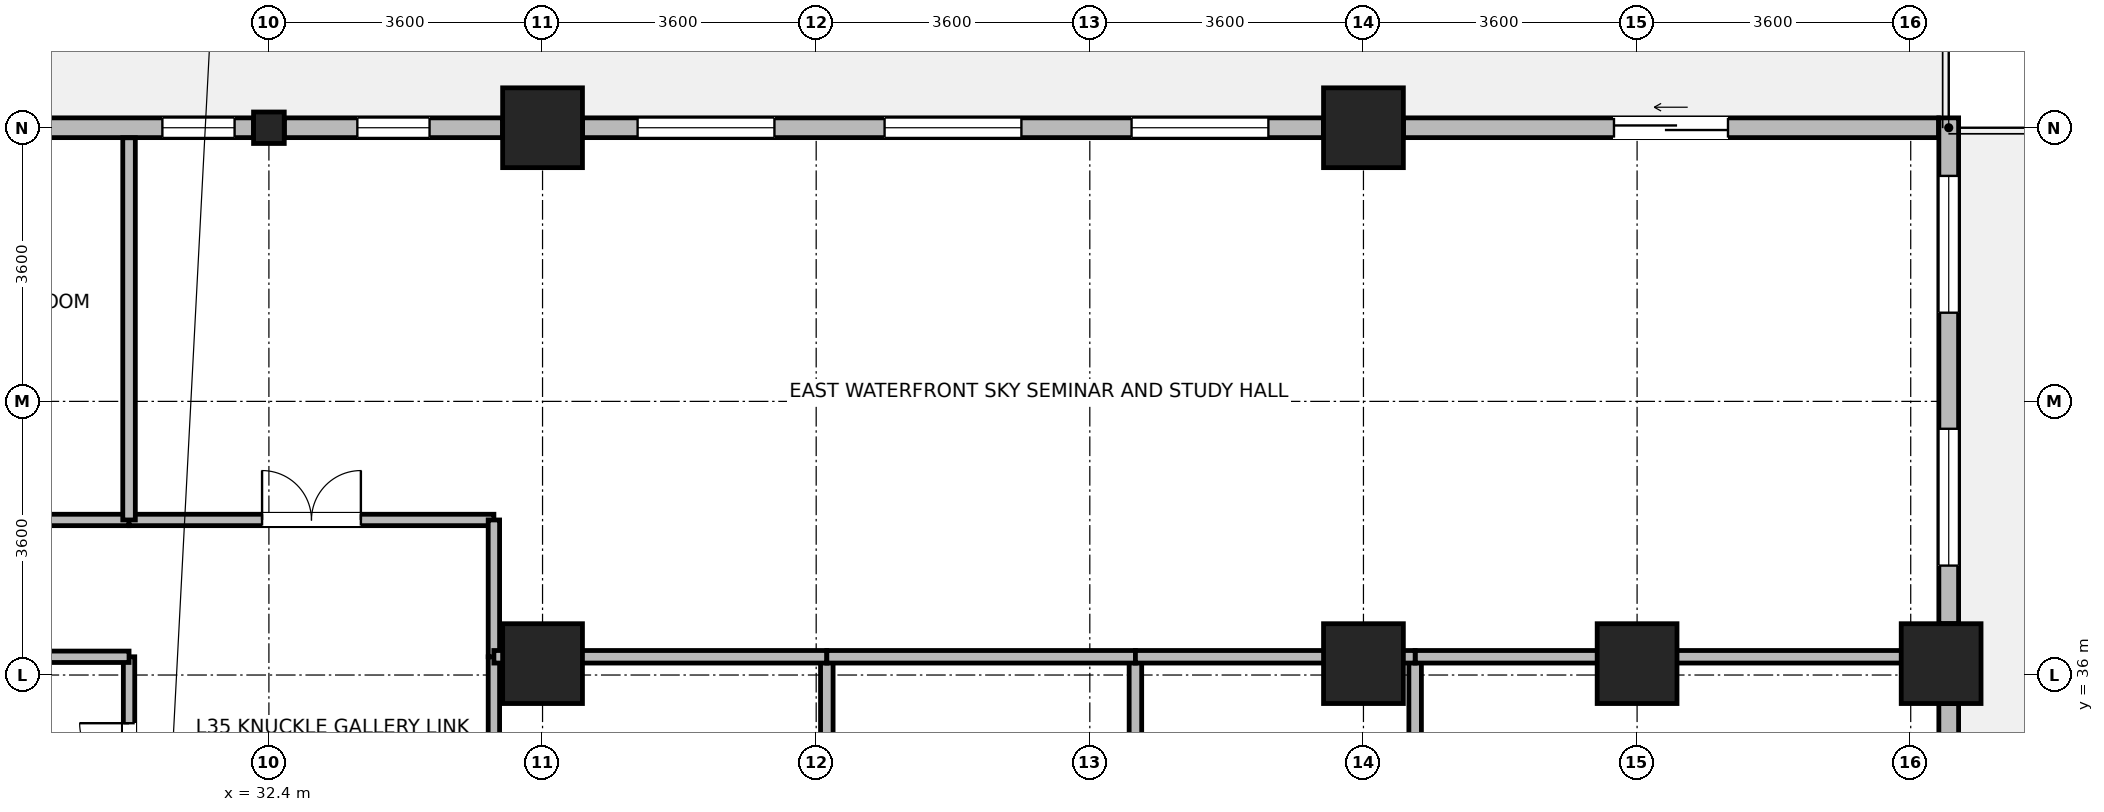
"""IFC4 building model, lengths in metres.
Left out: names, types, materials, properties, quantities, classifications, styles, units other than length and angle.
Written with IfcOpenShell. Run it as: python <this file> out.ifc"""

import sys

from ifc_helpers import new_model, si_unit, direction, frame, frame_2d, origin, origin_2d, place, context, subcontext, project, spatial, rectangle, i_section, extrude, source, transform, mapped, element, fill, save


model = new_model("IFC4")
c1 = context("Model", 3, precision=1e-05, world=origin(), true_north=direction((0.0, 1.0)))
c2 = subcontext(c1, "Body", "Model", "MODEL_VIEW")
j1 = project(units=[si_unit("LENGTHUNIT", "METRE"), si_unit("PLANEANGLEUNIT", "RADIAN")], contexts=[c1])
p1 = place(None, origin())
s1 = spatial("IfcSite", under=j1, at=p1, CompositionType="ELEMENT")
p2 = place(p1, origin())
s2 = spatial("IfcBuilding", under=s1, at=p2, CompositionType="ELEMENT")
p3 = place(p2, frame((0.0, 0.0, 140.2)))
s3 = spatial("IfcBuildingStorey", under=s2, at=p3, CompositionType="ELEMENT", Elevation=140.2)
m1 = source(origin(), c2, "Body", "SweptSolid", [
    extrude(rectangle(XDim=1.05, YDim=1.05, at=origin_2d()), origin(), (0.0, 0.0, 1.0), 3.7),
])
for number, where, z_axis, x_axis in (
    (1, (36.0, 43.2, 0.0), (0.0, 0.0, 1.0), (1.0, 0.0, 0.0)),
    (2, (36.0, 36.15, 0.0), (0.0, 0.0, 1.0), (1.0, 0.0, 0.0)),
    (3, (46.8, 36.15, 0.0), (0.0, 0.0, 1.0), (1.0, 0.0, 0.0)),
    (4, (46.8, 43.2, 0.0), (0.0, 0.0, 1.0), (1.0, 0.0, 0.0)),
    (5, (50.4, 36.15, 0.0), (0.0, 0.0, 1.0), (1.0, 0.0, 0.0)),
    (6, (54.4, 36.15, 0.0), (0.0, 0.0, 1.0), (1.0, 0.0, 0.0)),
):
    element("IfcColumn", number, at=place(p3, frame(where, z_axis=z_axis, x_axis=x_axis)), inside=s3, PredefinedType="COLUMN", context=c2, shape_type="MappedRepresentation", body=[
        mapped(m1, transform((0.0, 0.0, 0.0), x_axis=(1.0, 0.0, 0.0), y_axis=(0.0, 1.0, 0.0), z_axis=(0.0, 0.0, 1.0), scale=1.0)),
    ])
m2 = source(origin(), c2, "Body", "SweptSolid", [
    extrude(i_section(OverallWidth=0.404, OverallDepth=0.414, WebThickness=0.021, FlangeThickness=0.028, FilletRadius=0.015, at=origin_2d()), origin(), (0.0, 0.0, 1.0), 3.7),
])
p4 = place(p3, frame((32.4, 43.2, 0.0), z_axis=(0.0, 0.0, 1.0), x_axis=(1.0, 0.0, 0.0)))
e7 = element("IfcColumn", 7, at=p4, inside=s3, PredefinedType="COLUMN", context=c2, shape_type="MappedRepresentation", body=[
    mapped(m2, transform((0.0, 0.0, 0.0), x_axis=(1.0, 0.0, 0.0), y_axis=(0.0, 1.0, 0.0), z_axis=(0.0, 0.0, 1.0), scale=1.0)),
])
p5 = place(p3, frame((54.5, 35.624, 0.0), z_axis=(0.0, 0.0, 1.0), x_axis=(0.0, -1.0, 0.0)))
e8 = element("IfcWall", 8, at=p5, inside=s3, PredefinedType="STANDARD", context=c2, shape_type="SweptSolid", body=[
    extrude(rectangle(XDim=6.448, YDim=0.26, at=frame_2d((3.224, 0.0))), origin(), (0.0, 0.0, 1.0), 2.99),
])
p6 = place(p5, frame((0.712, 0.0, 0.85)))
e9 = element("IfcOpeningElement", 9, at=p6, cuts=e8, PredefinedType="OPENING", context=c2, shape_type="SweptSolid", body=[
    extrude(rectangle(XDim=1.8, YDim=1.85, at=frame_2d((0.9, 0.925))), frame((0.0, 0.14, 0.0), z_axis=(0.0, -1.0, 0.0), x_axis=(1.0, 0.0, 0.0)), (0.0, 0.0, 1.0), 0.28),
])
p7 = place(p5, frame((3.936, 0.0, 0.85)))
e10 = element("IfcOpeningElement", 10, at=p7, cuts=e8, PredefinedType="OPENING", context=c2, shape_type="SweptSolid", body=[
    extrude(rectangle(XDim=1.8, YDim=1.85, at=frame_2d((0.9, 0.925))), frame((0.0, 0.14, 0.0), z_axis=(0.0, -1.0, 0.0), x_axis=(1.0, 0.0, 0.0)), (0.0, 0.0, 1.0), 0.28),
])
p8 = place(p3, frame((54.5, 43.33, 0.0), z_axis=(0.0, 0.0, 1.0), x_axis=(0.0, -1.0, 0.0)))
e11 = element("IfcWall", 11, at=p8, inside=s3, PredefinedType="STANDARD", context=c2, shape_type="SweptSolid", body=[
    extrude(rectangle(XDim=6.654, YDim=0.26, at=frame_2d((3.327, 0.0))), origin(), (0.0, 0.0, 1.0), 3.44),
])
p9 = place(p8, frame((0.763, 0.0, 0.85)))
e12 = element("IfcOpeningElement", 12, at=p9, cuts=e11, PredefinedType="OPENING", context=c2, shape_type="SweptSolid", body=[
    extrude(rectangle(XDim=1.8, YDim=1.85, at=frame_2d((0.9, 0.925))), frame((0.0, 0.14, 0.0), z_axis=(0.0, -1.0, 0.0), x_axis=(1.0, 0.0, 0.0)), (0.0, 0.0, 1.0), 0.28),
])
p10 = place(p8, frame((4.091, 0.0, 0.85)))
e13 = element("IfcOpeningElement", 13, at=p10, cuts=e11, PredefinedType="OPENING", context=c2, shape_type="SweptSolid", body=[
    extrude(rectangle(XDim=1.8, YDim=1.85, at=frame_2d((0.9, 0.925))), frame((0.0, 0.14, 0.0), z_axis=(0.0, -1.0, 0.0), x_axis=(1.0, 0.0, 0.0)), (0.0, 0.0, 1.0), 0.28),
])
p11 = place(p3, frame((47.326, 43.2, 0.0), z_axis=(0.0, 0.0, 1.0), x_axis=(1.0, 0.0, 0.0)))
e14 = element("IfcWall", 14, at=p11, inside=s3, PredefinedType="STANDARD", context=c2, shape_type="SweptSolid", body=[
    extrude(rectangle(XDim=7.039, YDim=0.26, at=frame_2d((3.52, 0.0))), origin(), (0.0, 0.0, 1.0), 3.44),
])
p12 = place(p11, frame((2.77, 0.0, 0.0)))
e15 = element("IfcOpeningElement", 15, at=p12, cuts=e14, PredefinedType="OPENING", context=c2, shape_type="SweptSolid", body=[
    extrude(rectangle(XDim=1.5, YDim=2.15, at=frame_2d((0.75, 1.075))), frame((0.0, 0.14, 0.0), z_axis=(0.0, -1.0, 0.0), x_axis=(1.0, 0.0, 0.0)), (0.0, 0.0, 1.0), 0.28),
])
p13 = place(p3, frame((36.526, 43.2, 0.0), z_axis=(0.0, 0.0, 1.0), x_axis=(1.0, 0.0, 0.0)))
e16 = element("IfcWall", 16, at=p13, inside=s3, PredefinedType="STANDARD", context=c2, shape_type="SweptSolid", body=[
    extrude(rectangle(XDim=9.748, YDim=0.26, at=frame_2d((4.874, 0.0))), origin(), (0.0, 0.0, 1.0), 2.99),
])
p14 = place(p13, frame((0.725, 0.0, 0.85)))
e17 = element("IfcOpeningElement", 17, at=p14, cuts=e16, PredefinedType="OPENING", context=c2, shape_type="SweptSolid", body=[
    extrude(rectangle(XDim=1.8, YDim=1.85, at=frame_2d((0.9, 0.925))), frame((0.0, 0.14, 0.0), z_axis=(0.0, -1.0, 0.0), x_axis=(1.0, 0.0, 0.0)), (0.0, 0.0, 1.0), 0.28),
])
p15 = place(p13, frame((3.974, 0.0, 0.85)))
e18 = element("IfcOpeningElement", 18, at=p15, cuts=e16, PredefinedType="OPENING", context=c2, shape_type="SweptSolid", body=[
    extrude(rectangle(XDim=1.8, YDim=1.85, at=frame_2d((0.9, 0.925))), frame((0.0, 0.14, 0.0), z_axis=(0.0, -1.0, 0.0), x_axis=(1.0, 0.0, 0.0)), (0.0, 0.0, 1.0), 0.28),
])
p16 = place(p13, frame((7.223, 0.0, 0.85)))
e19 = element("IfcOpeningElement", 19, at=p16, cuts=e16, PredefinedType="OPENING", context=c2, shape_type="SweptSolid", body=[
    extrude(rectangle(XDim=1.8, YDim=1.85, at=frame_2d((0.9, 0.925))), frame((0.0, 0.14, 0.0), z_axis=(0.0, -1.0, 0.0), x_axis=(1.0, 0.0, 0.0)), (0.0, 0.0, 1.0), 0.28),
])
p17 = place(p3, frame((32.603, 43.2, 0.0), z_axis=(0.0, 0.0, 1.0), x_axis=(1.0, 0.0, 0.0)))
e20 = element("IfcWall", 20, at=p17, inside=s3, PredefinedType="STANDARD", context=c2, shape_type="SweptSolid", body=[
    extrude(rectangle(XDim=2.871, YDim=0.26, at=frame_2d((1.436, 0.0))), origin(), (0.0, 0.0, 1.0), 2.99),
])
p18 = place(p17, frame((0.96, 0.0, 0.85)))
e21 = element("IfcOpeningElement", 21, at=p18, cuts=e20, PredefinedType="OPENING", context=c2, shape_type="SweptSolid", body=[
    extrude(rectangle(XDim=0.95, YDim=1.75, at=frame_2d((0.475, 0.875))), frame((0.0, 0.14, 0.0), z_axis=(0.0, -1.0, 0.0), x_axis=(1.0, 0.0, 0.0)), (0.0, 0.0, 1.0), 0.28),
])
p19 = place(p3, frame((29.326, 43.2, 0.0), z_axis=(0.0, 0.0, 1.0), x_axis=(1.0, 0.0, 0.0)))
e22 = element("IfcWall", 22, at=p19, inside=s3, PredefinedType="STANDARD", context=c2, shape_type="SweptSolid", body=[
    extrude(rectangle(XDim=2.871, YDim=0.26, at=frame_2d((1.436, 0.0))), origin(), (0.0, 0.0, 1.0), 2.99),
])
p20 = place(p19, frame((1.673, 0.0, 0.85)))
e23 = element("IfcOpeningElement", 23, at=p20, cuts=e22, PredefinedType="OPENING", context=c2, shape_type="SweptSolid", body=[
    extrude(rectangle(XDim=0.95, YDim=1.75, at=frame_2d((0.475, 0.875))), frame((0.0, 0.14, 0.0), z_axis=(0.0, -1.0, 0.0), x_axis=(1.0, 0.0, 0.0)), (0.0, 0.0, 1.0), 0.28),
])
p21 = place(p3, frame((35.36, 28.56, 0.0), z_axis=(0.0, 0.0, 1.0), x_axis=(0.0, 1.0, 0.0)))
e24 = element("IfcWall", 24, at=p21, inside=s3, PredefinedType="PARTITIONING", context=c2, shape_type="SweptSolid", body=[
    extrude(rectangle(XDim=7.68, YDim=0.15, at=frame_2d((3.84, 0.0))), origin(), (0.0, 0.0, 1.0), 3.44),
])
p22 = place(p21, frame((3.19, 0.0, 0.0)))
e25 = element("IfcOpeningElement", 25, at=p22, cuts=e24, PredefinedType="OPENING", context=c2, shape_type="SweptSolid", body=[
    extrude(rectangle(XDim=1.3, YDim=2.12, at=frame_2d((0.65, 1.06))), frame((0.0, 0.085, 0.0), z_axis=(0.0, -1.0, 0.0), x_axis=(1.0, 0.0, 0.0)), (0.0, 0.0, 1.0), 0.17),
])
p23 = place(p3, frame((25.08, 38.04, 0.0), z_axis=(0.0, 0.0, 1.0), x_axis=(1.0, 0.0, 0.0)))
e26 = element("IfcWall", 26, at=p23, inside=s3, PredefinedType="PARTITIONING", context=c2, shape_type="SweptSolid", body=[
    extrude(rectangle(XDim=5.48, YDim=0.15, at=frame_2d((2.74, 0.0))), origin(), (0.0, 0.0, 1.0), 3.44),
])
p24 = place(p23, frame((2.09, 0.0, 0.0)))
e27 = element("IfcOpeningElement", 27, at=p24, cuts=e26, PredefinedType="OPENING", context=c2, shape_type="SweptSolid", body=[
    extrude(rectangle(XDim=1.3, YDim=2.12, at=frame_2d((0.65, 1.06))), frame((0.0, 0.085, 0.0), z_axis=(0.0, -1.0, 0.0), x_axis=(1.0, 0.0, 0.0)), (0.0, 0.0, 1.0), 0.17),
])
p25 = place(p3, frame((30.56, 38.04, 0.0), z_axis=(0.0, 0.0, 1.0), x_axis=(1.0, 0.0, 0.0)))
e28 = element("IfcWall", 28, at=p25, inside=s3, PredefinedType="PARTITIONING", context=c2, shape_type="SweptSolid", body=[
    extrude(rectangle(XDim=4.8, YDim=0.15, at=frame_2d((2.4, 0.0))), origin(), (0.0, 0.0, 1.0), 3.44),
])
p26 = place(p25, frame((1.75, 0.0, 0.0)))
e29 = element("IfcOpeningElement", 29, at=p26, cuts=e28, PredefinedType="OPENING", context=c2, shape_type="SweptSolid", body=[
    extrude(rectangle(XDim=1.3, YDim=2.12, at=frame_2d((0.65, 1.06))), frame((0.0, 0.085, 0.0), z_axis=(0.0, -1.0, 0.0), x_axis=(1.0, 0.0, 0.0)), (0.0, 0.0, 1.0), 0.17),
])
p27 = place(p3, frame((30.56, 33.7, 0.0), z_axis=(0.0, 0.0, 1.0), x_axis=(0.0, 1.0, 0.0)))
e30 = element("IfcWall", 30, at=p27, inside=s3, PredefinedType="PARTITIONING", context=c2, shape_type="SweptSolid", body=[
    extrude(rectangle(XDim=2.54, YDim=0.15, at=frame_2d((1.27, 0.0))), origin(), (0.0, 0.0, 1.0), 3.44),
])
p28 = place(p27, frame((0.366, 0.0, 0.0)))
e31 = element("IfcOpeningElement", 31, at=p28, cuts=e30, PredefinedType="OPENING", context=c2, shape_type="SweptSolid", body=[
    extrude(rectangle(XDim=1.3, YDim=2.12, at=frame_2d((0.65, 1.06))), frame((0.0, 0.085, 0.0), z_axis=(0.0, -1.0, 0.0), x_axis=(1.0, 0.0, 0.0)), (0.0, 0.0, 1.0), 0.17),
])
p29 = place(p3, frame((35.36, 36.24, 0.0), z_axis=(0.0, 0.0, 1.0), x_axis=(0.0, 1.0, 0.0)))
e32 = element("IfcWall", 32, at=p29, inside=s3, PredefinedType="PARTITIONING", context=c2, shape_type="SweptSolid", body=[
    extrude(rectangle(XDim=1.8, YDim=0.15, at=frame_2d((0.9, 0.0))), origin(), (0.0, 0.0, 1.0), 3.44),
])
p30 = place(p3, frame((29.325, 36.24, 0.0), z_axis=(0.0, 0.0, 1.0), x_axis=(1.0, 0.0, 0.0)))
e33 = element("IfcWall", 33, at=p30, inside=s3, PredefinedType="PARTITIONING", context=c2, shape_type="SweptSolid", body=[
    extrude(rectangle(XDim=1.235, YDim=0.15, at=frame_2d((0.618, 0.0))), origin(), (0.0, 0.0, 1.0), 2.84),
])
for number, where, z_axis, x_axis in (
    (34, (39.74, 28.56, 0.0), (0.0, 0.0, 1.0), (0.0, 1.0, 0.0)),
    (35, (43.8, 28.56, 0.0), (0.0, 0.0, 1.0), (0.0, 1.0, 0.0)),
    (36, (47.48, 28.56, 0.0), (0.0, 0.0, 1.0), (0.0, 1.0, 0.0)),
):
    element("IfcWall", number, at=place(p3, frame(where, z_axis=z_axis, x_axis=x_axis)), inside=s3, PredefinedType="PARTITIONING", context=c2, shape_type="SweptSolid", body=[
        extrude(rectangle(XDim=7.68, YDim=0.165, at=frame_2d((3.84, 0.0))), origin(), (0.0, 0.0, 1.0), 3.44),
    ])
p31 = place(p3, frame((47.48, 36.24, 0.0), z_axis=(0.0, 0.0, 1.0), x_axis=(1.0, 0.0, 0.0)))
e37 = element("IfcWall", 37, at=p31, inside=s3, PredefinedType="PARTITIONING", context=c2, shape_type="SweptSolid", body=[
    extrude(rectangle(XDim=6.888, YDim=0.165, at=frame_2d((3.444, 0.0))), origin(), (0.0, 0.0, 1.0), 2.84),
])
p32 = place(p3, frame((30.56, 38.04, 0.0), z_axis=(0.0, 0.0, 1.0), x_axis=(0.0, 1.0, 0.0)))
e38 = element("IfcWall", 38, at=p32, inside=s3, PredefinedType="PARTITIONING", context=c2, shape_type="SweptSolid", body=[
    extrude(rectangle(XDim=5.028, YDim=0.165, at=frame_2d((2.514, 0.0))), origin(), (0.0, 0.0, 1.0), 3.44),
])
p33 = place(p3, frame((35.36, 36.24, 0.0), z_axis=(0.0, 0.0, 1.0), x_axis=(1.0, 0.0, 0.0)))
e39 = element("IfcWall", 39, at=p33, inside=s3, PredefinedType="PARTITIONING", context=c2, shape_type="SweptSolid", body=[
    extrude(rectangle(XDim=4.38, YDim=0.165, at=frame_2d((2.19, 0.0))), origin(), (0.0, 0.0, 1.0), 2.84),
])
p34 = place(p3, frame((39.74, 36.24, 0.0), z_axis=(0.0, 0.0, 1.0), x_axis=(1.0, 0.0, 0.0)))
e40 = element("IfcWall", 40, at=p34, inside=s3, PredefinedType="PARTITIONING", context=c2, shape_type="SweptSolid", body=[
    extrude(rectangle(XDim=4.06, YDim=0.165, at=frame_2d((2.03, 0.0))), origin(), (0.0, 0.0, 1.0), 2.84),
])
p35 = place(p3, frame((43.8, 36.24, 0.0), z_axis=(0.0, 0.0, 1.0), x_axis=(1.0, 0.0, 0.0)))
e41 = element("IfcWall", 41, at=p35, inside=s3, PredefinedType="PARTITIONING", context=c2, shape_type="SweptSolid", body=[
    extrude(rectangle(XDim=3.68, YDim=0.165, at=frame_2d((1.84, 0.0))), origin(), (0.0, 0.0, 1.0), 2.84),
])
p36 = place(p9, origin())
e42 = element("IfcWindow", 42, at=p36, inside=s3, PartitioningType="SINGLE_PANEL", PredefinedType="WINDOW", context=c2, shape_type="SweptSolid", body=[
    extrude(rectangle(XDim=1.8, YDim=1.85, at=frame_2d((0.9, 0.925))), frame((0.0, 0.03, 0.0), z_axis=(0.0, -1.0, 0.0), x_axis=(1.0, 0.0, 0.0)), (0.0, 0.0, 1.0), 0.06),
])
fill(e12, e42)
p37 = place(p10, origin())
e43 = element("IfcWindow", 43, at=p37, inside=s3, PartitioningType="SINGLE_PANEL", PredefinedType="WINDOW", context=c2, shape_type="SweptSolid", body=[
    extrude(rectangle(XDim=1.8, YDim=1.85, at=frame_2d((0.9, 0.925))), frame((0.0, 0.03, 0.0), z_axis=(0.0, -1.0, 0.0), x_axis=(1.0, 0.0, 0.0)), (0.0, 0.0, 1.0), 0.06),
])
fill(e13, e43)
p38 = place(p12, origin())
e44 = element("IfcDoor", 44, at=p38, inside=s3, OperationType="SLIDING_TO_LEFT", PredefinedType="DOOR", context=c2, shape_type="SweptSolid", body=[
    extrude(rectangle(XDim=1.5, YDim=2.15, at=frame_2d((0.75, 1.075))), frame((0.0, 0.025, 0.0), z_axis=(0.0, -1.0, 0.0), x_axis=(1.0, 0.0, 0.0)), (0.0, 0.0, 1.0), 0.05),
])
fill(e15, e44)
p39 = place(p14, origin())
e45 = element("IfcWindow", 45, at=p39, inside=s3, PartitioningType="SINGLE_PANEL", PredefinedType="WINDOW", context=c2, shape_type="SweptSolid", body=[
    extrude(rectangle(XDim=1.8, YDim=1.85, at=frame_2d((0.9, 0.925))), frame((0.0, 0.03, 0.0), z_axis=(0.0, -1.0, 0.0), x_axis=(1.0, 0.0, 0.0)), (0.0, 0.0, 1.0), 0.06),
])
fill(e17, e45)
p40 = place(p15, origin())
e46 = element("IfcWindow", 46, at=p40, inside=s3, PartitioningType="SINGLE_PANEL", PredefinedType="WINDOW", context=c2, shape_type="SweptSolid", body=[
    extrude(rectangle(XDim=1.8, YDim=1.85, at=frame_2d((0.9, 0.925))), frame((0.0, 0.03, 0.0), z_axis=(0.0, -1.0, 0.0), x_axis=(1.0, 0.0, 0.0)), (0.0, 0.0, 1.0), 0.06),
])
fill(e18, e46)
p41 = place(p16, origin())
e47 = element("IfcWindow", 47, at=p41, inside=s3, PartitioningType="SINGLE_PANEL", PredefinedType="WINDOW", context=c2, shape_type="SweptSolid", body=[
    extrude(rectangle(XDim=1.8, YDim=1.85, at=frame_2d((0.9, 0.925))), frame((0.0, 0.03, 0.0), z_axis=(0.0, -1.0, 0.0), x_axis=(1.0, 0.0, 0.0)), (0.0, 0.0, 1.0), 0.06),
])
fill(e19, e47)
p42 = place(p18, origin())
e48 = element("IfcWindow", 48, at=p42, inside=s3, PartitioningType="SINGLE_PANEL", PredefinedType="WINDOW", context=c2, shape_type="SweptSolid", body=[
    extrude(rectangle(XDim=0.95, YDim=1.75, at=frame_2d((0.475, 0.875))), frame((0.0, 0.03, 0.0), z_axis=(0.0, -1.0, 0.0), x_axis=(1.0, 0.0, 0.0)), (0.0, 0.0, 1.0), 0.06),
])
fill(e21, e48)
p43 = place(p20, origin())
e49 = element("IfcWindow", 49, at=p43, inside=s3, PartitioningType="SINGLE_PANEL", PredefinedType="WINDOW", context=c2, shape_type="SweptSolid", body=[
    extrude(rectangle(XDim=0.95, YDim=1.75, at=frame_2d((0.475, 0.875))), frame((0.0, 0.03, 0.0), z_axis=(0.0, -1.0, 0.0), x_axis=(1.0, 0.0, 0.0)), (0.0, 0.0, 1.0), 0.06),
])
fill(e23, e49)
p44 = place(p26, origin())
e50 = element("IfcDoor", 50, at=p44, inside=s3, OperationType="DOUBLE_DOOR_SINGLE_SWING", PredefinedType="DOOR", context=c2, shape_type="SweptSolid", body=[
    extrude(rectangle(XDim=1.3, YDim=2.12, at=frame_2d((0.65, 1.06))), frame((0.0, 0.025, 0.0), z_axis=(0.0, -1.0, 0.0), x_axis=(1.0, 0.0, 0.0)), (0.0, 0.0, 1.0), 0.05),
])
fill(e29, e50)
p45 = place(p28, origin())
e51 = element("IfcDoor", 51, at=p45, inside=s3, OperationType="DOUBLE_DOOR_SINGLE_SWING", PredefinedType="DOOR", context=c2, shape_type="SweptSolid", body=[
    extrude(rectangle(XDim=1.3, YDim=2.12, at=frame_2d((0.65, 1.06))), frame((0.0, 0.025, 0.0), z_axis=(0.0, -1.0, 0.0), x_axis=(1.0, 0.0, 0.0)), (0.0, 0.0, 1.0), 0.05),
])
fill(e31, e51)
save(model, sys.argv[1])
